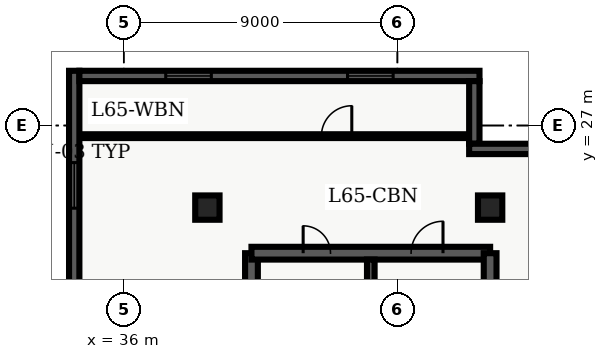
"""IFC4 building model, lengths in metres.
Left out: names, types, materials, properties, quantities, classifications, styles, units other than length and angle.
Written with IfcOpenShell. Run it as: python <this file> out.ifc"""

import sys

from ifc_helpers import new_model, entity, si_unit, converted_unit, direction, frame, origin_with_axes, origin_2d_with_axis, place, context, subcontext, project, spatial, polyline, rectangle, outline, extrude, element, fill, save


model = new_model("IFC4")
c1 = context("Model", 3, precision=1e-05, world=origin_with_axes(), true_north=direction((0.0, 1.0)))
c2 = subcontext(c1, "Body", "Model", "MODEL_VIEW")
j1 = project(units=[si_unit("LENGTHUNIT", "METRE"), converted_unit("PLANEANGLEUNIT", "DEGREE", entity("IfcPlaneAngleMeasure", 0.017), si_unit("PLANEANGLEUNIT", "RADIAN"), dimensions=[0, 0, 0, 0, 0, 0, 0])], contexts=[c1])
p1 = place(None, origin_with_axes())
s1 = spatial("IfcSite", under=j1, at=p1, CompositionType="ELEMENT")
p2 = place(p1, origin_with_axes())
s2 = spatial("IfcBuilding", under=s1, at=p2, CompositionType="ELEMENT")
p3 = place(p2, frame((0.0, 0.0, 264.6), z_axis=(0.0, 0.0, 1.0), x_axis=(1.0, 0.0, 0.0)))
s3 = spatial("IfcBuildingStorey", under=s2, at=p3, CompositionType="ELEMENT", Elevation=264.6)
p4 = place(p3, frame((40.2, 7.2, 0.0), z_axis=(0.0, 0.0, 1.0), x_axis=(0.0, 1.0, 0.0)))
e1 = element("IfcWall", 1, at=p4, inside=s3, PredefinedType="SHEAR", context=c2, shape_type="SweptSolid", body=[
    extrude(outline(polyline([(0.0, -0.21), (15.6, -0.21), (15.6, 0.21), (0.0, 0.21), (0.0, -0.21)])), origin_with_axes(), (0.0, 0.0, 1.0), 3.66),
])
p5 = place(p4, frame((12.75, 0.0, 0.0), z_axis=(0.0, 0.0, 1.0), x_axis=(1.0, 0.0, 0.0)))
e2 = element("IfcOpeningElement", 2, at=p5, cuts=e1, PredefinedType="OPENING", context=c2, shape_type="SweptSolid", body=[
    extrude(rectangle(XDim=1.2, YDim=0.44, at=origin_2d_with_axis()), origin_with_axes(), (0.0, 0.0, 1.0), 2.15),
])
p6 = place(p4, frame((9.3, 0.0, 0.0), z_axis=(0.0, 0.0, 1.0), x_axis=(1.0, 0.0, 0.0)))
e3 = element("IfcOpeningElement", 3, at=p6, cuts=e1, PredefinedType="OPENING", context=c2, shape_type="SweptSolid", body=[
    extrude(rectangle(XDim=0.9, YDim=0.44, at=origin_2d_with_axis()), origin_with_axes(), (0.0, 0.0, 1.0), 2.15),
])
p7 = place(p3, frame((40.2, 22.8, 0.0), z_axis=(0.0, 0.0, 1.0), x_axis=(1.0, 0.0, 0.0)))
e4 = element("IfcWall", 4, at=p7, inside=s3, PredefinedType="SHEAR", context=c2, shape_type="SweptSolid", body=[
    extrude(outline(polyline([(0.0, -0.21), (7.85, -0.21), (7.85, 0.21), (0.0, 0.21), (0.0, -0.21)])), origin_with_axes(), (0.0, 0.0, 1.0), 3.66),
])
p8 = place(p7, frame((5.775, 0.0, 0.0), z_axis=(0.0, 0.0, 1.0), x_axis=(1.0, 0.0, 0.0)))
e5 = element("IfcOpeningElement", 5, at=p8, cuts=e4, PredefinedType="OPENING", context=c2, shape_type="SweptSolid", body=[
    extrude(rectangle(XDim=1.05, YDim=0.44, at=origin_2d_with_axis()), origin_with_axes(), (0.0, 0.0, 1.0), 2.15),
])
p9 = place(p7, frame((2.15, 0.0, 0.0), z_axis=(0.0, 0.0, 1.0), x_axis=(1.0, 0.0, 0.0)))
e6 = element("IfcOpeningElement", 6, at=p9, cuts=e4, PredefinedType="OPENING", context=c2, shape_type="SweptSolid", body=[
    extrude(rectangle(XDim=0.9, YDim=0.44, at=origin_2d_with_axis()), origin_with_axes(), (0.0, 0.0, 1.0), 2.15),
])
p10 = place(p3, frame((48.05, 7.2, 0.0), z_axis=(0.0, 0.0, 1.0), x_axis=(0.0, 1.0, 0.0)))
e7 = element("IfcWall", 7, at=p10, inside=s3, PredefinedType="SHEAR", context=c2, shape_type="SweptSolid", body=[
    extrude(outline(polyline([(0.0, -0.21), (15.6, -0.21), (15.6, 0.21), (0.0, 0.21), (0.0, -0.21)])), origin_with_axes(), (0.0, 0.0, 1.0), 3.66),
])
p11 = place(p10, frame((1.375, 0.0, 0.0), z_axis=(0.0, 0.0, 1.0), x_axis=(1.0, 0.0, 0.0)))
e8 = element("IfcOpeningElement", 8, at=p11, cuts=e7, PredefinedType="OPENING", context=c2, shape_type="SweptSolid", body=[
    extrude(rectangle(XDim=1.05, YDim=0.44, at=origin_2d_with_axis()), origin_with_axes(), (0.0, 0.0, 1.0), 2.15),
])
p12 = place(p10, frame((5.125, 0.0, 0.0), z_axis=(0.0, 0.0, 1.0), x_axis=(1.0, 0.0, 0.0)))
e9 = element("IfcOpeningElement", 9, at=p12, cuts=e7, PredefinedType="OPENING", context=c2, shape_type="SweptSolid", body=[
    extrude(rectangle(XDim=0.95, YDim=0.44, at=origin_2d_with_axis()), origin_with_axes(), (0.0, 0.0, 1.0), 2.15),
])
p13 = place(p3, frame((44.125, 7.41, 0.0), z_axis=(0.0, 0.0, 1.0), x_axis=(0.0, 1.0, 0.0)))
e10 = element("IfcWall", 10, at=p13, inside=s3, PredefinedType="SHEAR", context=c2, shape_type="SweptSolid", body=[
    extrude(outline(polyline([(0.0, -0.125), (15.18, -0.125), (15.18, 0.125), (0.0, 0.125), (0.0, -0.125)])), origin_with_axes(), (0.0, 0.0, 1.0), 3.66),
])
for number, where, z_axis, x_axis in (
    (11, (38.75, 24.3, 0.0), (0.0, 0.0, 1.0), (1.0, 0.0, 0.0)),
    (12, (48.05, 24.3, 0.0), (0.0, 0.0, 1.0), (1.0, 0.0, 0.0)),
):
    element("IfcColumn", number, at=place(p3, frame(where, z_axis=z_axis, x_axis=x_axis)), inside=s3, PredefinedType="COLUMN", context=c2, shape_type="SweptSolid", body=[
        extrude(rectangle(XDim=0.8, YDim=0.8, at=origin_2d_with_axis()), origin_with_axes(), (0.0, 0.0, 1.0), 3.9),
    ])
p14 = place(p3, frame((34.535, 26.65, 0.0), z_axis=(0.0, 0.0, 1.0), x_axis=(1.0, 0.0, 0.0)))
e13 = element("IfcWall", 13, at=p14, inside=s3, PredefinedType="PARTITIONING", context=c2, shape_type="SweptSolid", body=[
    extrude(outline(polyline([(0.0, -0.062), (12.995, -0.062), (12.995, 0.062), (0.0, 0.062), (0.0, -0.062)])), origin_with_axes(), (0.0, 0.0, 1.0), 2.7),
])
p15 = place(p14, frame((8.465, 0.0, 0.0), z_axis=(0.0, 0.0, 1.0), x_axis=(1.0, 0.0, 0.0)))
e14 = element("IfcOpeningElement", 14, at=p15, cuts=e13, PredefinedType="OPENING", context=c2, shape_type="SweptSolid", body=[
    extrude(rectangle(XDim=1.0, YDim=0.145, at=origin_2d_with_axis()), origin_with_axes(), (0.0, 0.0, 1.0), 2.15),
])
p16 = place(p3, frame((34.37, 21.26, 0.0), z_axis=(0.0, 0.0, 1.0), x_axis=(0.0, 1.0, 0.0)))
e15 = element("IfcWall", 15, at=p16, inside=s3, PredefinedType="SOLIDWALL", context=c2, shape_type="SweptSolid", body=[
    extrude(outline(polyline([(0.0, -0.17), (7.54, -0.17), (7.54, 0.17), (0.0, 0.17), (0.0, -0.17)])), origin_with_axes(), (0.0, 0.0, 1.0), 3.66),
])
p17 = place(p16, frame((3.77, 0.0, 0.45), z_axis=(0.0, 0.0, 1.0), x_axis=(1.0, 0.0, 0.0)))
e16 = element("IfcOpeningElement", 16, at=p17, cuts=e15, PredefinedType="OPENING", context=c2, shape_type="SweptSolid", body=[
    extrude(rectangle(XDim=1.5, YDim=0.36, at=origin_2d_with_axis()), origin_with_axes(), (0.0, 0.0, 1.0), 2.1),
])
p18 = place(p3, frame((34.54, 28.63, 0.0), z_axis=(0.0, 0.0, 1.0), x_axis=(1.0, 0.0, 0.0)))
e17 = element("IfcWall", 17, at=p18, inside=s3, PredefinedType="SOLIDWALL", context=c2, shape_type="SweptSolid", body=[
    extrude(outline(polyline([(0.0, -0.17), (13.16, -0.17), (13.16, 0.17), (0.0, 0.17), (0.0, -0.17)])), origin_with_axes(), (0.0, 0.0, 1.0), 3.66),
])
p19 = place(p18, frame((3.59, 0.0, 0.45), z_axis=(0.0, 0.0, 1.0), x_axis=(1.0, 0.0, 0.0)))
e18 = element("IfcOpeningElement", 18, at=p19, cuts=e17, PredefinedType="OPENING", context=c2, shape_type="SweptSolid", body=[
    extrude(rectangle(XDim=1.5, YDim=0.36, at=origin_2d_with_axis()), origin_with_axes(), (0.0, 0.0, 1.0), 2.1),
])
p20 = place(p18, frame((9.57, 0.0, 0.45), z_axis=(0.0, 0.0, 1.0), x_axis=(1.0, 0.0, 0.0)))
e19 = element("IfcOpeningElement", 19, at=p20, cuts=e17, PredefinedType="OPENING", context=c2, shape_type="SweptSolid", body=[
    extrude(rectangle(XDim=1.5, YDim=0.36, at=origin_2d_with_axis()), origin_with_axes(), (0.0, 0.0, 1.0), 2.1),
])
p21 = place(p3, frame((47.53, 28.46, 0.0), z_axis=(0.0, 0.0, 1.0), x_axis=(0.0, -1.0, 0.0)))
e20 = element("IfcWall", 20, at=p21, inside=s3, PredefinedType="SOLIDWALL", context=c2, shape_type="SweptSolid", body=[
    extrude(outline(polyline([(0.0, -0.17), (2.06, -0.17), (2.06, 0.17), (0.0, 0.17), (0.0, -0.17)])), origin_with_axes(), (0.0, 0.0, 1.0), 3.66),
])
p22 = place(p3, frame((47.36, 26.23, 0.0), z_axis=(0.0, 0.0, 1.0), x_axis=(1.0, 0.0, 0.0)))
e21 = element("IfcWall", 21, at=p22, inside=s3, PredefinedType="SOLIDWALL", context=c2, shape_type="SweptSolid", body=[
    extrude(outline(polyline([(0.0, -0.17), (2.74, -0.17), (2.74, 0.17), (0.0, 0.17), (0.0, -0.17)])), origin_with_axes(), (0.0, 0.0, 1.0), 3.66),
])
p23 = place(p7, frame((5.775, 0.0, 0.0), z_axis=(0.0, 0.0, 1.0), x_axis=(1.0, 0.0, 0.0)))
e22 = element("IfcDoor", 22, at=p23, inside=s3, OperationType="SINGLE_SWING_RIGHT", PredefinedType="DOOR", context=c2, shape_type="SweptSolid", body=[
    extrude(rectangle(XDim=1.05, YDim=0.09, at=origin_2d_with_axis()), origin_with_axes(), (0.0, 0.0, 1.0), 2.15),
])
fill(e5, e22)
p24 = place(p7, frame((2.15, 0.0, 0.0), z_axis=(0.0, 0.0, 1.0), x_axis=(1.0, 0.0, 0.0)))
e23 = element("IfcDoor", 23, at=p24, inside=s3, OperationType="SINGLE_SWING_LEFT", PredefinedType="DOOR", context=c2, shape_type="SweptSolid", body=[
    extrude(rectangle(XDim=0.9, YDim=0.09, at=origin_2d_with_axis()), origin_with_axes(), (0.0, 0.0, 1.0), 2.15),
])
fill(e6, e23)
p25 = place(p14, frame((8.465, 0.0, 0.0), z_axis=(0.0, 0.0, 1.0), x_axis=(1.0, 0.0, 0.0)))
e24 = element("IfcDoor", 24, at=p25, inside=s3, OperationType="SINGLE_SWING_RIGHT", PredefinedType="DOOR", context=c2, shape_type="SweptSolid", body=[
    extrude(rectangle(XDim=1.0, YDim=0.075, at=origin_2d_with_axis()), origin_with_axes(), (0.0, 0.0, 1.0), 2.15),
])
fill(e14, e24)
p26 = place(p16, frame((3.77, 0.0, 0.45), z_axis=(0.0, 0.0, 1.0), x_axis=(1.0, 0.0, 0.0)))
e25 = element("IfcWindow", 25, at=p26, inside=s3, PredefinedType="WINDOW", context=c2, shape_type="SweptSolid", body=[
    extrude(rectangle(XDim=1.5, YDim=0.09, at=origin_2d_with_axis()), origin_with_axes(), (0.0, 0.0, 1.0), 2.1),
])
fill(e16, e25)
p27 = place(p18, frame((3.59, 0.0, 0.45), z_axis=(0.0, 0.0, 1.0), x_axis=(1.0, 0.0, 0.0)))
e26 = element("IfcWindow", 26, at=p27, inside=s3, PredefinedType="WINDOW", context=c2, shape_type="SweptSolid", body=[
    extrude(rectangle(XDim=1.5, YDim=0.09, at=origin_2d_with_axis()), origin_with_axes(), (0.0, 0.0, 1.0), 2.1),
])
fill(e18, e26)
p28 = place(p18, frame((9.57, 0.0, 0.45), z_axis=(0.0, 0.0, 1.0), x_axis=(1.0, 0.0, 0.0)))
e27 = element("IfcWindow", 27, at=p28, inside=s3, PredefinedType="WINDOW", context=c2, shape_type="SweptSolid", body=[
    extrude(rectangle(XDim=1.5, YDim=0.09, at=origin_2d_with_axis()), origin_with_axes(), (0.0, 0.0, 1.0), 2.1),
])
fill(e19, e27)
save(model, sys.argv[1])
